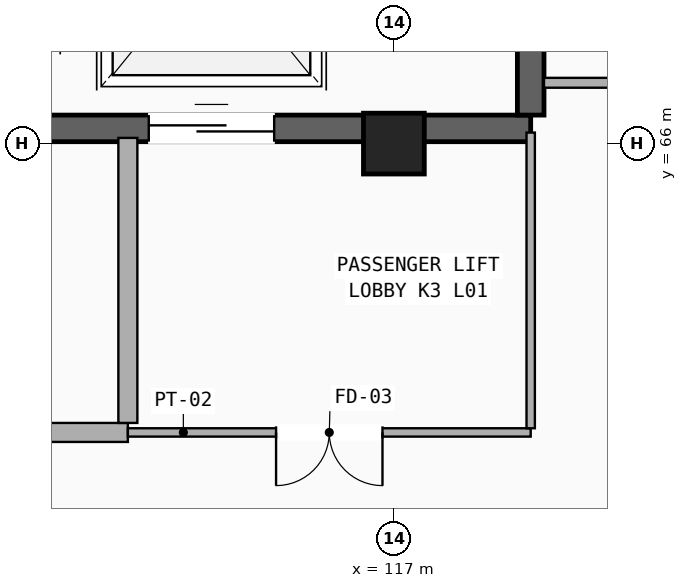
"""IFC4 building model, lengths in metres.
Left out: names, types, materials, properties, quantities, classifications, styles, units other than length and angle.
Written with IfcOpenShell. Run it as: python <this file> out.ifc"""

import sys

from ifc_helpers import new_model, si_unit, direction, frame, frame_2d, origin, origin_2d, place, context, subcontext, project, spatial, rectangle, extrude, element, fill, save


model = new_model("IFC4")
c1 = context("Model", 3, precision=1e-05, world=origin(), true_north=direction((0.0, 1.0)))
c2 = subcontext(c1, "Body", "Model", "MODEL_VIEW")
j1 = project(units=[si_unit("LENGTHUNIT", "METRE"), si_unit("PLANEANGLEUNIT", "RADIAN")], contexts=[c1])
p1 = place(None, origin())
s1 = spatial("IfcSite", under=j1, at=p1, CompositionType="ELEMENT")
p2 = place(p1, origin())
s2 = spatial("IfcBuilding", under=s1, at=p2, CompositionType="ELEMENT")
p3 = place(p2, frame((0.0, 0.0, 5.1)))
s3 = spatial("IfcBuildingStorey", under=s2, at=p3, CompositionType="ELEMENT", Elevation=5.1)
p4 = place(p3, frame((117.0, 66.0, 0.0), z_axis=(0.0, 0.0, 1.0), x_axis=(1.0, 0.0, 0.0)))
e1 = element("IfcColumn", 1, at=p4, inside=s3, PredefinedType="COLUMN", context=c2, shape_type="SweptSolid", body=[
    extrude(rectangle(XDim=0.8, YDim=0.8, at=origin_2d()), origin(), (0.0, 0.0, 1.0), 4.42),
])
p5 = place(p3, frame((108.5, 66.2, 0.0), z_axis=(0.0, 0.0, 1.0), x_axis=(1.0, 0.0, 0.0)))
e2 = element("IfcWall", 2, at=p5, inside=s3, PredefinedType="SHEAR", context=c2, shape_type="SweptSolid", body=[
    extrude(rectangle(XDim=10.3, YDim=0.35, at=frame_2d((5.15, 0.0))), origin(), (0.0, 0.0, 1.0), 4.42),
])
p6 = place(p5, frame((0.45, 0.0, 0.0)))
e3 = element("IfcOpeningElement", 3, at=p6, cuts=e2, PredefinedType="OPENING", context=c2, shape_type="SweptSolid", body=[
    extrude(rectangle(XDim=1.1, YDim=2.2, at=frame_2d((0.55, 1.1))), frame((0.0, 0.185, 0.0), z_axis=(0.0, -1.0, 0.0), x_axis=(1.0, 0.0, 0.0)), (0.0, 0.0, 1.0), 0.37),
])
p7 = place(p5, frame((2.09, 0.0, 0.0)))
e4 = element("IfcOpeningElement", 4, at=p7, cuts=e2, PredefinedType="OPENING", context=c2, shape_type="SweptSolid", body=[
    extrude(rectangle(XDim=1.22, YDim=2.2, at=frame_2d((0.61, 1.1))), frame((0.0, 0.185, 0.0), z_axis=(0.0, -1.0, 0.0), x_axis=(1.0, 0.0, 0.0)), (0.0, 0.0, 1.0), 0.37),
])
p8 = place(p5, frame((5.275, 0.0, 0.0)))
e5 = element("IfcOpeningElement", 5, at=p8, cuts=e2, PredefinedType="OPENING", context=c2, shape_type="SweptSolid", body=[
    extrude(rectangle(XDim=1.65, YDim=2.34, at=frame_2d((0.825, 1.17))), frame((0.0, 0.185, 0.0), z_axis=(0.0, -1.0, 0.0), x_axis=(1.0, 0.0, 0.0)), (0.0, 0.0, 1.0), 0.37),
])
p9 = place(p3, frame((118.8, 66.375, 0.0), z_axis=(0.0, 0.0, 1.0), x_axis=(0.0, 1.0, 0.0)))
e6 = element("IfcWall", 6, at=p9, inside=s3, PredefinedType="SHEAR", context=c2, shape_type="SweptSolid", body=[
    extrude(rectangle(XDim=8.25, YDim=0.35, at=frame_2d((4.125, 0.0))), origin(), (0.0, 0.0, 1.0), 4.42),
])
p10 = place(p3, frame((108.5, 62.2, 0.0), z_axis=(0.0, 0.0, 1.0), x_axis=(1.0, 0.0, 0.0)))
e7 = element("IfcWall", 7, at=p10, inside=s3, PredefinedType="PARTITIONING", context=c2, shape_type="SweptSolid", body=[
    extrude(rectangle(XDim=5.0, YDim=0.25, at=frame_2d((2.5, 0.0))), origin(), (0.0, 0.0, 1.0), 4.16),
])
p11 = place(p10, frame((1.95, 0.0, 0.0)))
e8 = element("IfcOpeningElement", 8, at=p11, cuts=e7, PredefinedType="OPENING", context=c2, shape_type="SweptSolid", body=[
    extrude(rectangle(XDim=1.1, YDim=2.2, at=frame_2d((0.55, 1.1))), frame((0.0, 0.135, 0.0), z_axis=(0.0, -1.0, 0.0), x_axis=(1.0, 0.0, 0.0)), (0.0, 0.0, 1.0), 0.27),
])
p12 = place(p3, frame((113.5, 62.325, 0.0), z_axis=(0.0, 0.0, 1.0), x_axis=(0.0, 1.0, 0.0)))
e9 = element("IfcWall", 9, at=p12, inside=s3, PredefinedType="PARTITIONING", context=c2, shape_type="SweptSolid", body=[
    extrude(rectangle(XDim=3.75, YDim=0.25, at=frame_2d((1.875, 0.0))), origin(), (0.0, 0.0, 1.0), 3.39),
])
p13 = place(p3, frame((113.5, 62.2, 0.0), z_axis=(0.0, 0.0, 1.0), x_axis=(1.0, 0.0, 0.0)))
e10 = element("IfcWall", 10, at=p13, inside=s3, PredefinedType="PARTITIONING", context=c2, shape_type="SweptSolid", body=[
    extrude(rectangle(XDim=5.3, YDim=0.11, at=frame_2d((2.65, 0.0))), origin(), (0.0, 0.0, 1.0), 4.16),
])
p14 = place(p13, frame((1.95, 0.0, 0.0)))
e11 = element("IfcOpeningElement", 11, at=p14, cuts=e10, PredefinedType="OPENING", context=c2, shape_type="SweptSolid", body=[
    extrude(rectangle(XDim=1.4, YDim=2.2, at=frame_2d((0.7, 1.1))), frame((0.0, 0.065, 0.0), z_axis=(0.0, -1.0, 0.0), x_axis=(1.0, 0.0, 0.0)), (0.0, 0.0, 1.0), 0.13),
])
p15 = place(p3, frame((118.8, 62.255, 0.0), z_axis=(0.0, 0.0, 1.0), x_axis=(0.0, 1.0, 0.0)))
e12 = element("IfcWall", 12, at=p15, inside=s3, PredefinedType="PARTITIONING", context=c2, shape_type="SweptSolid", body=[
    extrude(rectangle(XDim=3.89, YDim=0.11, at=frame_2d((1.945, 0.0))), origin(), (0.0, 0.0, 1.0), 3.24),
])
p16 = place(p3, frame((118.975, 66.8, 0.0), z_axis=(0.0, 0.0, 1.0), x_axis=(1.0, 0.0, 0.0)))
e13 = element("IfcWall", 13, at=p16, inside=s3, PredefinedType="PARTITIONING", context=c2, shape_type="SweptSolid", body=[
    extrude(rectangle(XDim=15.825, YDim=0.13, at=frame_2d((7.913, 0.0))), origin(), (0.0, 0.0, 1.0), 3.44),
])
p17 = place(p16, frame((9.38, 0.0, 0.0)))
e14 = element("IfcOpeningElement", 14, at=p17, cuts=e13, PredefinedType="OPENING", context=c2, shape_type="SweptSolid", body=[
    extrude(rectangle(XDim=1.2, YDim=2.2, at=frame_2d((0.6, 1.1))), frame((0.0, 0.075, 0.0), z_axis=(0.0, -1.0, 0.0), x_axis=(1.0, 0.0, 0.0)), (0.0, 0.0, 1.0), 0.15),
])
p18 = place(p8, origin())
e15 = element("IfcDoor", 15, at=p18, inside=s3, OperationType="SLIDING_TO_LEFT", PredefinedType="DOOR", context=c2, shape_type="SweptSolid", body=[
    extrude(rectangle(XDim=1.65, YDim=2.34, at=frame_2d((0.825, 1.17))), frame((0.0, 0.025, 0.0), z_axis=(0.0, -1.0, 0.0), x_axis=(1.0, 0.0, 0.0)), (0.0, 0.0, 1.0), 0.05),
])
fill(e5, e15)
p19 = place(p14, frame((1.4, 0.0, 0.0), z_axis=(0.0, 0.0, 1.0), x_axis=(-1.0, 0.0, 0.0)))
e16 = element("IfcDoor", 16, at=p19, inside=s3, OperationType="DOUBLE_DOOR_SINGLE_SWING", PredefinedType="DOOR", context=c2, shape_type="SweptSolid", body=[
    extrude(rectangle(XDim=1.4, YDim=2.2, at=frame_2d((0.7, 1.1))), frame((0.0, 0.025, 0.0), z_axis=(0.0, -1.0, 0.0), x_axis=(1.0, 0.0, 0.0)), (0.0, 0.0, 1.0), 0.05),
])
fill(e11, e16)
save(model, sys.argv[1])
